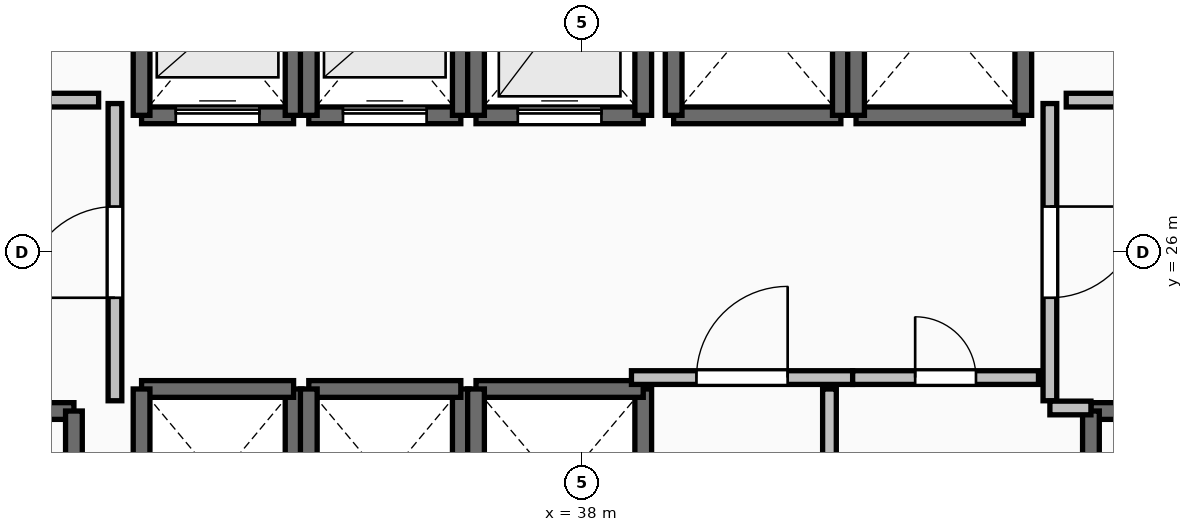
"""IFC4 building model, lengths in metres.
Left out: names, types, materials, properties, quantities, classifications, styles, units other than length and angle.
Written with IfcOpenShell. Run it as: python <this file> out.ifc"""

import sys

from ifc_helpers import new_model, si_unit, direction, frame, frame_2d, origin, place, context, subcontext, project, spatial, rectangle, extrude, element, fill, save


model = new_model("IFC4")
c1 = context("Model", 3, precision=1e-05, world=origin(), true_north=direction((0.0, 1.0)))
c2 = subcontext(c1, "Body", "Model", "MODEL_VIEW")
j1 = project(units=[si_unit("LENGTHUNIT", "METRE"), si_unit("PLANEANGLEUNIT", "RADIAN")], contexts=[c1])
p1 = place(None, origin())
s1 = spatial("IfcSite", under=j1, at=p1, CompositionType="ELEMENT")
p2 = place(p1, origin())
s2 = spatial("IfcBuilding", under=s1, at=p2, CompositionType="ELEMENT")
p3 = place(p2, frame((0.0, 0.0, 85.8)))
s3 = spatial("IfcBuildingStorey", under=s2, at=p3, CompositionType="ELEMENT", Elevation=85.8)
p4 = place(p3, frame((27.94, 23.91, 0.0), z_axis=(0.0, 0.0, 1.0), x_axis=(1.0, 0.0, 0.0)))
e1 = element("IfcWall", 1, at=p4, inside=s3, PredefinedType="SOLIDWALL", context=c2, shape_type="SweptSolid", body=[
    extrude(rectangle(XDim=3.37, YDim=0.22, at=frame_2d((1.685, 0.0))), origin(), (0.0, 0.0, 1.0), 3.24),
])
p5 = place(p4, frame((1.135, 0.0, 0.0)))
e2 = element("IfcOpeningElement", 2, at=p5, cuts=e1, PredefinedType="OPENING", context=c2, shape_type="SweptSolid", body=[
    extrude(rectangle(XDim=1.1, YDim=2.15, at=frame_2d((0.55, 1.075))), frame((0.0, 0.125, 0.0), z_axis=(0.0, -1.0, 0.0), x_axis=(1.0, 0.0, 0.0)), (0.0, 0.0, 1.0), 0.25),
])
p6 = place(p3, frame((31.31, 23.91, 0.0), z_axis=(0.0, 0.0, 1.0), x_axis=(0.0, -1.0, 0.0)))
e3 = element("IfcWall", 3, at=p6, inside=s3, PredefinedType="SOLIDWALL", context=c2, shape_type="SweptSolid", body=[
    extrude(rectangle(XDim=7.42, YDim=0.22, at=frame_2d((3.71, 0.0))), origin(), (0.0, 0.0, 1.0), 3.24),
])
p7 = place(p3, frame((44.69, 23.91, 0.0), z_axis=(0.0, 0.0, 1.0), x_axis=(1.0, 0.0, 0.0)))
e4 = element("IfcWall", 4, at=p7, inside=s3, PredefinedType="SOLIDWALL", context=c2, shape_type="SweptSolid", body=[
    extrude(rectangle(XDim=3.37, YDim=0.22, at=frame_2d((1.685, 0.0))), origin(), (0.0, 0.0, 1.0), 3.24),
])
p8 = place(p7, frame((1.135, 0.0, 0.0)))
e5 = element("IfcOpeningElement", 5, at=p8, cuts=e4, PredefinedType="OPENING", context=c2, shape_type="SweptSolid", body=[
    extrude(rectangle(XDim=1.1, YDim=2.15, at=frame_2d((0.55, 1.075))), frame((0.0, 0.125, 0.0), z_axis=(0.0, -1.0, 0.0), x_axis=(1.0, 0.0, 0.0)), (0.0, 0.0, 1.0), 0.25),
])
p9 = place(p3, frame((44.69, 16.49, 0.0), z_axis=(0.0, 0.0, 1.0), x_axis=(0.0, 1.0, 0.0)))
e6 = element("IfcWall", 6, at=p9, inside=s3, PredefinedType="SOLIDWALL", context=c2, shape_type="SweptSolid", body=[
    extrude(rectangle(XDim=7.42, YDim=0.22, at=frame_2d((3.71, 0.0))), origin(), (0.0, 0.0, 1.0), 3.24),
])
p10 = place(p3, frame((32.2, 27.8, 0.0), z_axis=(0.0, 0.0, 1.0), x_axis=(1.0, 0.0, 0.0)))
e7 = element("IfcWall", 7, at=p10, inside=s3, PredefinedType="SOLIDWALL", context=c2, shape_type="SweptSolid", body=[
    extrude(rectangle(XDim=2.0, YDim=0.22, at=frame_2d((1.0, 0.0))), origin(), (0.0, 0.0, 1.0), 3.24),
])
p11 = place(p10, frame((0.45, 0.0, 0.0)))
e8 = element("IfcOpeningElement", 8, at=p11, cuts=e7, PredefinedType="OPENING", context=c2, shape_type="SweptSolid", body=[
    extrude(rectangle(XDim=1.1, YDim=2.2, at=frame_2d((0.55, 1.1))), frame((0.0, 0.125, 0.0), z_axis=(0.0, -1.0, 0.0), x_axis=(1.0, 0.0, 0.0)), (0.0, 0.0, 1.0), 0.25),
])
for number, where, z_axis, x_axis in (
    (9, (34.2, 27.8, 0.0), (0.0, 0.0, 1.0), (0.0, 1.0, 0.0)),
    (10, (32.2, 30.2, 0.0), (0.0, 0.0, 1.0), (0.0, -1.0, 0.0)),
):
    element("IfcWall", number, at=place(p3, frame(where, z_axis=z_axis, x_axis=x_axis)), inside=s3, PredefinedType="SOLIDWALL", context=c2, shape_type="SweptSolid", body=[
        extrude(rectangle(XDim=2.4, YDim=0.22, at=frame_2d((1.2, 0.0))), origin(), (0.0, 0.0, 1.0), 3.24),
    ])
p12 = place(p3, frame((34.4, 27.8, 0.0), z_axis=(0.0, 0.0, 1.0), x_axis=(1.0, 0.0, 0.0)))
e11 = element("IfcWall", 11, at=p12, inside=s3, PredefinedType="SOLIDWALL", context=c2, shape_type="SweptSolid", body=[
    extrude(rectangle(XDim=2.0, YDim=0.22, at=frame_2d((1.0, 0.0))), origin(), (0.0, 0.0, 1.0), 3.24),
])
p13 = place(p12, frame((0.45, 0.0, 0.0)))
e12 = element("IfcOpeningElement", 12, at=p13, cuts=e11, PredefinedType="OPENING", context=c2, shape_type="SweptSolid", body=[
    extrude(rectangle(XDim=1.1, YDim=2.2, at=frame_2d((0.55, 1.1))), frame((0.0, 0.125, 0.0), z_axis=(0.0, -1.0, 0.0), x_axis=(1.0, 0.0, 0.0)), (0.0, 0.0, 1.0), 0.25),
])
for number, where, z_axis, x_axis in (
    (13, (36.4, 27.8, 0.0), (0.0, 0.0, 1.0), (0.0, 1.0, 0.0)),
    (14, (34.4, 30.2, 0.0), (0.0, 0.0, 1.0), (0.0, -1.0, 0.0)),
):
    element("IfcWall", number, at=place(p3, frame(where, z_axis=z_axis, x_axis=x_axis)), inside=s3, PredefinedType="SOLIDWALL", context=c2, shape_type="SweptSolid", body=[
        extrude(rectangle(XDim=2.4, YDim=0.22, at=frame_2d((1.2, 0.0))), origin(), (0.0, 0.0, 1.0), 3.24),
    ])
p14 = place(p3, frame((36.6, 27.8, 0.0), z_axis=(0.0, 0.0, 1.0), x_axis=(1.0, 0.0, 0.0)))
e15 = element("IfcWall", 15, at=p14, inside=s3, PredefinedType="SOLIDWALL", context=c2, shape_type="SweptSolid", body=[
    extrude(rectangle(XDim=2.2, YDim=0.22, at=frame_2d((1.1, 0.0))), origin(), (0.0, 0.0, 1.0), 3.24),
])
p15 = place(p14, frame((0.55, 0.0, 0.0)))
e16 = element("IfcOpeningElement", 16, at=p15, cuts=e15, PredefinedType="OPENING", context=c2, shape_type="SweptSolid", body=[
    extrude(rectangle(XDim=1.1, YDim=2.2, at=frame_2d((0.55, 1.1))), frame((0.0, 0.125, 0.0), z_axis=(0.0, -1.0, 0.0), x_axis=(1.0, 0.0, 0.0)), (0.0, 0.0, 1.0), 0.25),
])
for number, where, z_axis, x_axis in (
    (17, (38.8, 27.8, 0.0), (0.0, 0.0, 1.0), (0.0, 1.0, 0.0)),
    (18, (36.6, 30.4, 0.0), (0.0, 0.0, 1.0), (0.0, -1.0, 0.0)),
):
    element("IfcWall", number, at=place(p3, frame(where, z_axis=z_axis, x_axis=x_axis)), inside=s3, PredefinedType="SOLIDWALL", context=c2, shape_type="SweptSolid", body=[
        extrude(rectangle(XDim=2.6, YDim=0.22, at=frame_2d((1.3, 0.0))), origin(), (0.0, 0.0, 1.0), 3.24),
    ])
p16 = place(p3, frame((34.2, 21.8, 0.0), z_axis=(0.0, 0.0, 1.0), x_axis=(0.0, 1.0, 0.0)))
e19 = element("IfcWall", 19, at=p16, inside=s3, PredefinedType="SOLIDWALL", context=c2, shape_type="SweptSolid", body=[
    extrude(rectangle(XDim=2.4, YDim=0.22, at=frame_2d((1.2, 0.0))), origin(), (0.0, 0.0, 1.0), 3.24),
])
p17 = place(p3, frame((34.2, 24.2, 0.0), z_axis=(0.0, 0.0, 1.0), x_axis=(-1.0, 0.0, 0.0)))
e20 = element("IfcWall", 20, at=p17, inside=s3, PredefinedType="SOLIDWALL", context=c2, shape_type="SweptSolid", body=[
    extrude(rectangle(XDim=2.0, YDim=0.22, at=frame_2d((1.0, 0.0))), origin(), (0.0, 0.0, 1.0), 3.24),
])
for number, where, z_axis, x_axis in (
    (21, (32.2, 24.2, 0.0), (0.0, 0.0, 1.0), (0.0, -1.0, 0.0)),
    (22, (36.4, 21.8, 0.0), (0.0, 0.0, 1.0), (0.0, 1.0, 0.0)),
):
    element("IfcWall", number, at=place(p3, frame(where, z_axis=z_axis, x_axis=x_axis)), inside=s3, PredefinedType="SOLIDWALL", context=c2, shape_type="SweptSolid", body=[
        extrude(rectangle(XDim=2.4, YDim=0.22, at=frame_2d((1.2, 0.0))), origin(), (0.0, 0.0, 1.0), 3.24),
    ])
p18 = place(p3, frame((36.4, 24.2, 0.0), z_axis=(0.0, 0.0, 1.0), x_axis=(-1.0, 0.0, 0.0)))
e23 = element("IfcWall", 23, at=p18, inside=s3, PredefinedType="SOLIDWALL", context=c2, shape_type="SweptSolid", body=[
    extrude(rectangle(XDim=2.0, YDim=0.22, at=frame_2d((1.0, 0.0))), origin(), (0.0, 0.0, 1.0), 3.24),
])
p19 = place(p3, frame((34.4, 24.2, 0.0), z_axis=(0.0, 0.0, 1.0), x_axis=(0.0, -1.0, 0.0)))
e24 = element("IfcWall", 24, at=p19, inside=s3, PredefinedType="SOLIDWALL", context=c2, shape_type="SweptSolid", body=[
    extrude(rectangle(XDim=2.4, YDim=0.22, at=frame_2d((1.2, 0.0))), origin(), (0.0, 0.0, 1.0), 3.24),
])
p20 = place(p3, frame((38.8, 21.6, 0.0), z_axis=(0.0, 0.0, 1.0), x_axis=(0.0, 1.0, 0.0)))
e25 = element("IfcWall", 25, at=p20, inside=s3, PredefinedType="SOLIDWALL", context=c2, shape_type="SweptSolid", body=[
    extrude(rectangle(XDim=2.6, YDim=0.22, at=frame_2d((1.3, 0.0))), origin(), (0.0, 0.0, 1.0), 3.24),
])
p21 = place(p3, frame((38.8, 24.2, 0.0), z_axis=(0.0, 0.0, 1.0), x_axis=(-1.0, 0.0, 0.0)))
e26 = element("IfcWall", 26, at=p21, inside=s3, PredefinedType="SOLIDWALL", context=c2, shape_type="SweptSolid", body=[
    extrude(rectangle(XDim=2.2, YDim=0.22, at=frame_2d((1.1, 0.0))), origin(), (0.0, 0.0, 1.0), 3.24),
])
p22 = place(p3, frame((36.6, 24.2, 0.0), z_axis=(0.0, 0.0, 1.0), x_axis=(0.0, -1.0, 0.0)))
e27 = element("IfcWall", 27, at=p22, inside=s3, PredefinedType="SOLIDWALL", context=c2, shape_type="SweptSolid", body=[
    extrude(rectangle(XDim=2.6, YDim=0.22, at=frame_2d((1.3, 0.0))), origin(), (0.0, 0.0, 1.0), 3.24),
])
p23 = place(p3, frame((39.2, 27.8, 0.0), z_axis=(0.0, 0.0, 1.0), x_axis=(1.0, 0.0, 0.0)))
e28 = element("IfcWall", 28, at=p23, inside=s3, PredefinedType="SOLIDWALL", context=c2, shape_type="SweptSolid", body=[
    extrude(rectangle(XDim=2.2, YDim=0.22, at=frame_2d((1.1, 0.0))), origin(), (0.0, 0.0, 1.0), 3.24),
])
for number, where, z_axis, x_axis in (
    (29, (41.4, 27.8, 0.0), (0.0, 0.0, 1.0), (0.0, 1.0, 0.0)),
    (30, (39.2, 30.4, 0.0), (0.0, 0.0, 1.0), (0.0, -1.0, 0.0)),
):
    element("IfcWall", number, at=place(p3, frame(where, z_axis=z_axis, x_axis=x_axis)), inside=s3, PredefinedType="SOLIDWALL", context=c2, shape_type="SweptSolid", body=[
        extrude(rectangle(XDim=2.6, YDim=0.22, at=frame_2d((1.3, 0.0))), origin(), (0.0, 0.0, 1.0), 3.24),
    ])
p24 = place(p3, frame((41.6, 27.8, 0.0), z_axis=(0.0, 0.0, 1.0), x_axis=(1.0, 0.0, 0.0)))
e31 = element("IfcWall", 31, at=p24, inside=s3, PredefinedType="SOLIDWALL", context=c2, shape_type="SweptSolid", body=[
    extrude(rectangle(XDim=2.2, YDim=0.22, at=frame_2d((1.1, 0.0))), origin(), (0.0, 0.0, 1.0), 3.24),
])
for number, where, z_axis, x_axis in (
    (32, (43.8, 27.8, 0.0), (0.0, 0.0, 1.0), (0.0, 1.0, 0.0)),
    (33, (41.6, 30.4, 0.0), (0.0, 0.0, 1.0), (0.0, -1.0, 0.0)),
):
    element("IfcWall", number, at=place(p3, frame(where, z_axis=z_axis, x_axis=x_axis)), inside=s3, PredefinedType="SOLIDWALL", context=c2, shape_type="SweptSolid", body=[
        extrude(rectangle(XDim=2.6, YDim=0.22, at=frame_2d((1.3, 0.0))), origin(), (0.0, 0.0, 1.0), 3.24),
    ])
p25 = place(p3, frame((31.85, 24.045, 0.0), z_axis=(0.0, 0.0, 1.0), x_axis=(0.0, 1.0, 0.0)))
e34 = element("IfcWall", 34, at=p25, inside=s3, PredefinedType="PARTITIONING", context=c2, shape_type="SweptSolid", body=[
    extrude(rectangle(XDim=3.91, YDim=0.18, at=frame_2d((1.955, 0.0))), origin(), (0.0, 0.0, 1.0), 3.24),
])
p26 = place(p25, frame((1.355, 0.0, 0.0)))
e35 = element("IfcOpeningElement", 35, at=p26, cuts=e34, PredefinedType="OPENING", context=c2, shape_type="SweptSolid", body=[
    extrude(rectangle(XDim=1.2, YDim=2.15, at=frame_2d((0.6, 1.075))), frame((0.0, 0.105, 0.0), z_axis=(0.0, -1.0, 0.0), x_axis=(1.0, 0.0, 0.0)), (0.0, 0.0, 1.0), 0.21),
])
p27 = place(p3, frame((44.15, 27.955, 0.0), z_axis=(0.0, 0.0, 1.0), x_axis=(0.0, -1.0, 0.0)))
e36 = element("IfcWall", 36, at=p27, inside=s3, PredefinedType="PARTITIONING", context=c2, shape_type="SweptSolid", body=[
    extrude(rectangle(XDim=3.91, YDim=0.18, at=frame_2d((1.955, 0.0))), origin(), (0.0, 0.0, 1.0), 3.24),
])
p28 = place(p27, frame((1.355, 0.0, 0.0)))
e37 = element("IfcOpeningElement", 37, at=p28, cuts=e36, PredefinedType="OPENING", context=c2, shape_type="SweptSolid", body=[
    extrude(rectangle(XDim=1.2, YDim=2.15, at=frame_2d((0.6, 1.075))), frame((0.0, 0.105, 0.0), z_axis=(0.0, -1.0, 0.0), x_axis=(1.0, 0.0, 0.0)), (0.0, 0.0, 1.0), 0.21),
])
p29 = place(p3, frame((44.15, 23.95, 0.0), z_axis=(0.0, 0.0, 1.0), x_axis=(1.0, 0.0, 0.0)))
e38 = element("IfcWall", 38, at=p29, inside=s3, PredefinedType="PARTITIONING", context=c2, shape_type="SweptSolid", body=[
    extrude(rectangle(XDim=0.54, YDim=0.18, at=frame_2d((0.27, 0.0))), origin(), (0.0, 0.0, 1.0), 3.24),
])
p30 = place(p3, frame((38.645, 24.35, 0.0), z_axis=(0.0, 0.0, 1.0), x_axis=(1.0, 0.0, 0.0)))
e39 = element("IfcWall", 39, at=p30, inside=s3, PredefinedType="PARTITIONING", context=c2, shape_type="SweptSolid", body=[
    extrude(rectangle(XDim=2.91, YDim=0.18, at=frame_2d((1.455, 0.0))), origin(), (0.0, 0.0, 1.0), 3.24),
])
p31 = place(p30, frame((0.855, 0.0, 0.0)))
e40 = element("IfcOpeningElement", 40, at=p31, cuts=e39, PredefinedType="OPENING", context=c2, shape_type="SweptSolid", body=[
    extrude(rectangle(XDim=1.2, YDim=2.15, at=frame_2d((0.6, 1.075))), frame((0.0, 0.105, 0.0), z_axis=(0.0, -1.0, 0.0), x_axis=(1.0, 0.0, 0.0)), (0.0, 0.0, 1.0), 0.21),
])
p32 = place(p3, frame((41.555, 24.35, 0.0), z_axis=(0.0, 0.0, 1.0), x_axis=(1.0, 0.0, 0.0)))
e41 = element("IfcWall", 41, at=p32, inside=s3, PredefinedType="PARTITIONING", context=c2, shape_type="SweptSolid", body=[
    extrude(rectangle(XDim=2.445, YDim=0.18, at=frame_2d((1.223, 0.0))), origin(), (0.0, 0.0, 1.0), 3.24),
])
p33 = place(p32, frame((0.823, 0.0, 0.0)))
e42 = element("IfcOpeningElement", 42, at=p33, cuts=e41, PredefinedType="OPENING", context=c2, shape_type="SweptSolid", body=[
    extrude(rectangle(XDim=0.8, YDim=2.05, at=frame_2d((0.4, 1.025))), frame((0.0, 0.105, 0.0), z_axis=(0.0, -1.0, 0.0), x_axis=(1.0, 0.0, 0.0)), (0.0, 0.0, 1.0), 0.21),
])
p34 = place(p3, frame((41.25, 16.32, 0.0), z_axis=(0.0, 0.0, 1.0), x_axis=(0.0, 1.0, 0.0)))
e43 = element("IfcWall", 43, at=p34, inside=s3, PredefinedType="PARTITIONING", context=c2, shape_type="SweptSolid", body=[
    extrude(rectangle(XDim=7.88, YDim=0.18, at=frame_2d((3.94, 0.0))), origin(), (0.0, 0.0, 1.0), 3.24),
])
p35 = place(p34, frame((3.54, 0.0, 0.0)))
e44 = element("IfcOpeningElement", 44, at=p35, cuts=e43, PredefinedType="OPENING", context=c2, shape_type="SweptSolid", body=[
    extrude(rectangle(XDim=0.8, YDim=2.05, at=frame_2d((0.4, 1.025))), frame((0.0, 0.105, 0.0), z_axis=(0.0, -1.0, 0.0), x_axis=(1.0, 0.0, 0.0)), (0.0, 0.0, 1.0), 0.21),
])
for number, where, z_axis, x_axis in (
    (45, (31.635, 28.0, 0.0), (0.0, 0.0, 1.0), (-1.0, 0.0, 0.0)),
    (46, (45.28, 28.0, 0.0), (0.0, 0.0, 1.0), (-1.0, 0.0, 0.0)),
):
    element("IfcWall", number, at=place(p3, frame(where, z_axis=z_axis, x_axis=x_axis)), inside=s3, PredefinedType="PARTITIONING", context=c2, shape_type="SweptSolid", body=[
        extrude(rectangle(XDim=0.915, YDim=0.18, at=frame_2d((0.458, 0.0))), origin(), (0.0, 0.0, 1.0), 3.24),
    ])
p36 = place(p11, origin())
e47 = element("IfcDoor", 47, at=p36, inside=s3, OperationType="SLIDING_TO_LEFT", PredefinedType="DOOR", context=c2, shape_type="SweptSolid", body=[
    extrude(rectangle(XDim=1.1, YDim=2.2, at=frame_2d((0.55, 1.1))), frame((0.0, 0.025, 0.0), z_axis=(0.0, -1.0, 0.0), x_axis=(1.0, 0.0, 0.0)), (0.0, 0.0, 1.0), 0.05),
])
fill(e8, e47)
p37 = place(p13, origin())
e48 = element("IfcDoor", 48, at=p37, inside=s3, OperationType="SLIDING_TO_LEFT", PredefinedType="DOOR", context=c2, shape_type="SweptSolid", body=[
    extrude(rectangle(XDim=1.1, YDim=2.2, at=frame_2d((0.55, 1.1))), frame((0.0, 0.025, 0.0), z_axis=(0.0, -1.0, 0.0), x_axis=(1.0, 0.0, 0.0)), (0.0, 0.0, 1.0), 0.05),
])
fill(e12, e48)
p38 = place(p15, origin())
e49 = element("IfcDoor", 49, at=p38, inside=s3, OperationType="SLIDING_TO_LEFT", PredefinedType="DOOR", context=c2, shape_type="SweptSolid", body=[
    extrude(rectangle(XDim=1.1, YDim=2.2, at=frame_2d((0.55, 1.1))), frame((0.0, 0.025, 0.0), z_axis=(0.0, -1.0, 0.0), x_axis=(1.0, 0.0, 0.0)), (0.0, 0.0, 1.0), 0.05),
])
fill(e16, e49)
p39 = place(p26, origin())
e50 = element("IfcDoor", 50, at=p39, inside=s3, OperationType="SINGLE_SWING_LEFT", PredefinedType="DOOR", context=c2, shape_type="SweptSolid", body=[
    extrude(rectangle(XDim=1.2, YDim=2.15, at=frame_2d((0.6, 1.075))), frame((0.0, 0.025, 0.0), z_axis=(0.0, -1.0, 0.0), x_axis=(1.0, 0.0, 0.0)), (0.0, 0.0, 1.0), 0.05),
])
fill(e35, e50)
p40 = place(p28, origin())
e51 = element("IfcDoor", 51, at=p40, inside=s3, OperationType="SINGLE_SWING_LEFT", PredefinedType="DOOR", context=c2, shape_type="SweptSolid", body=[
    extrude(rectangle(XDim=1.2, YDim=2.15, at=frame_2d((0.6, 1.075))), frame((0.0, 0.025, 0.0), z_axis=(0.0, -1.0, 0.0), x_axis=(1.0, 0.0, 0.0)), (0.0, 0.0, 1.0), 0.05),
])
fill(e37, e51)
p41 = place(p31, origin())
e52 = element("IfcDoor", 52, at=p41, inside=s3, OperationType="SINGLE_SWING_RIGHT", PredefinedType="DOOR", context=c2, shape_type="SweptSolid", body=[
    extrude(rectangle(XDim=1.2, YDim=2.15, at=frame_2d((0.6, 1.075))), frame((0.0, 0.025, 0.0), z_axis=(0.0, -1.0, 0.0), x_axis=(1.0, 0.0, 0.0)), (0.0, 0.0, 1.0), 0.05),
])
fill(e40, e52)
p42 = place(p33, origin())
e53 = element("IfcDoor", 53, at=p42, inside=s3, OperationType="SINGLE_SWING_LEFT", PredefinedType="DOOR", context=c2, shape_type="SweptSolid", body=[
    extrude(rectangle(XDim=0.8, YDim=2.05, at=frame_2d((0.4, 1.025))), frame((0.0, 0.025, 0.0), z_axis=(0.0, -1.0, 0.0), x_axis=(1.0, 0.0, 0.0)), (0.0, 0.0, 1.0), 0.05),
])
fill(e42, e53)
save(model, sys.argv[1])
